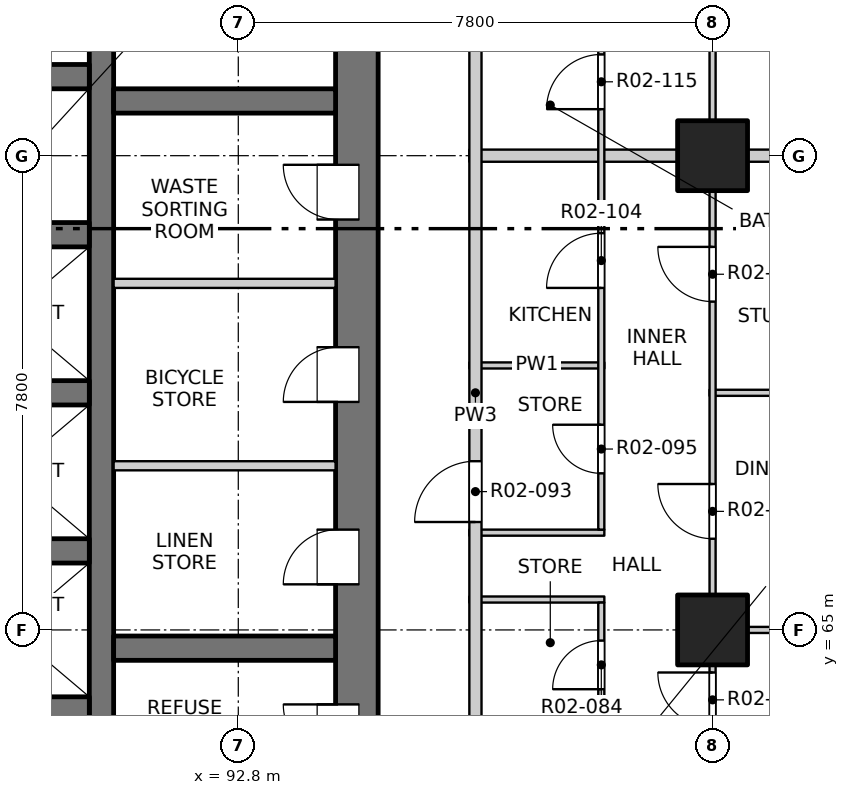
"""IFC4 building model, lengths in metres.
Left out: names, types, materials, properties, quantities, classifications, styles, units other than length and angle.
Written with IfcOpenShell. Run it as: python <this file> out.ifc"""

import sys

from ifc_helpers import new_model, si_unit, direction, frame, frame_2d, origin, origin_2d, place, context, subcontext, project, spatial, rectangle, extrude, element, fill, save


model = new_model("IFC4")
c1 = context("Model", 3, precision=1e-05, world=origin(), true_north=direction((0.0, 1.0)))
c2 = subcontext(c1, "Body", "Model", "MODEL_VIEW")
j1 = project(units=[si_unit("LENGTHUNIT", "METRE"), si_unit("PLANEANGLEUNIT", "RADIAN")], contexts=[c1])
p1 = place(None, origin())
s1 = spatial("IfcSite", under=j1, at=p1, CompositionType="ELEMENT")
p2 = place(p1, origin())
s2 = spatial("IfcBuilding", under=s1, at=p2, CompositionType="ELEMENT")
p3 = place(p2, frame((0.0, 0.0, 36.5)))
s3 = spatial("IfcBuildingStorey", under=s2, at=p3, CompositionType="ELEMENT", Elevation=36.5)
for number, where, z_axis, x_axis in (
    (1, (100.6, 65.0, -0.25), (0.0, 0.0, 1.0), (1.0, 0.0, 0.0)),
    (2, (100.6, 72.8, -0.25), (0.0, 0.0, 1.0), (1.0, 0.0, 0.0)),
):
    element("IfcColumn", number, at=place(p3, frame(where, z_axis=z_axis, x_axis=x_axis)), inside=s3, PredefinedType="COLUMN", context=c2, shape_type="SweptSolid", body=[
        extrude(rectangle(XDim=1.15, YDim=1.15, at=origin_2d()), origin(), (0.0, 0.0, 1.0), 3.4),
    ])
p4 = place(p3, frame((94.75, 61.95, -0.25), z_axis=(0.0, 0.0, 1.0), x_axis=(0.0, 1.0, 0.0)))
e3 = element("IfcWall", 3, at=p4, inside=s3, PredefinedType="SOLIDWALL", context=c2, shape_type="SweptSolid", body=[
    extrude(rectangle(XDim=15.35, YDim=0.7, at=frame_2d((7.675, 0.0))), origin(), (0.0, 0.0, 1.0), 3.4),
])
p5 = place(p4, frame((0.925, 0.0, 0.25)))
e4 = element("IfcOpeningElement", 4, at=p5, cuts=e3, PredefinedType="OPENING", context=c2, shape_type="SweptSolid", body=[
    extrude(rectangle(XDim=0.9, YDim=2.1, at=frame_2d((0.45, 1.05))), frame((0.0, 0.36, 0.0), z_axis=(0.0, -1.0, 0.0), x_axis=(1.0, 0.0, 0.0)), (0.0, 0.0, 1.0), 0.72),
])
p6 = place(p4, frame((3.8, 0.0, 0.25)))
e5 = element("IfcOpeningElement", 5, at=p6, cuts=e3, PredefinedType="OPENING", context=c2, shape_type="SweptSolid", body=[
    extrude(rectangle(XDim=0.9, YDim=2.1, at=frame_2d((0.45, 1.05))), frame((0.0, 0.36, 0.0), z_axis=(0.0, -1.0, 0.0), x_axis=(1.0, 0.0, 0.0)), (0.0, 0.0, 1.0), 0.72),
])
p7 = place(p4, frame((6.8, 0.0, 0.25)))
e6 = element("IfcOpeningElement", 6, at=p7, cuts=e3, PredefinedType="OPENING", context=c2, shape_type="SweptSolid", body=[
    extrude(rectangle(XDim=0.9, YDim=2.1, at=frame_2d((0.45, 1.05))), frame((0.0, 0.36, 0.0), z_axis=(0.0, -1.0, 0.0), x_axis=(1.0, 0.0, 0.0)), (0.0, 0.0, 1.0), 0.72),
])
p8 = place(p4, frame((9.8, 0.0, 0.25)))
e7 = element("IfcOpeningElement", 7, at=p8, cuts=e3, PredefinedType="OPENING", context=c2, shape_type="SweptSolid", body=[
    extrude(rectangle(XDim=0.9, YDim=2.1, at=frame_2d((0.45, 1.05))), frame((0.0, 0.36, 0.0), z_axis=(0.0, -1.0, 0.0), x_axis=(1.0, 0.0, 0.0)), (0.0, 0.0, 1.0), 0.72),
])
p9 = place(p4, frame((13.1, 0.0, 0.25)))
e8 = element("IfcOpeningElement", 8, at=p9, cuts=e3, PredefinedType="OPENING", context=c2, shape_type="SweptSolid", body=[
    extrude(rectangle(XDim=0.9, YDim=2.1, at=frame_2d((0.45, 1.05))), frame((0.0, 0.36, 0.0), z_axis=(0.0, -1.0, 0.0), x_axis=(1.0, 0.0, 0.0)), (0.0, 0.0, 1.0), 0.72),
])
p10 = place(p3, frame((90.55, 61.95, -0.25), z_axis=(0.0, 0.0, 1.0), x_axis=(0.0, 1.0, 0.0)))
e9 = element("IfcWall", 9, at=p10, inside=s3, PredefinedType="SOLIDWALL", context=c2, shape_type="SweptSolid", body=[
    extrude(rectangle(XDim=15.35, YDim=0.4, at=frame_2d((7.675, 0.0))), origin(), (0.0, 0.0, 1.0), 3.4),
])
for number, where, z_axis, x_axis in (
    (10, (87.35, 63.7, -0.25), (0.0, 0.0, 1.0), (1.0, 0.0, 0.0)),
    (11, (87.35, 66.3, -0.25), (0.0, 0.0, 1.0), (1.0, 0.0, 0.0)),
    (12, (87.35, 68.9, -0.25), (0.0, 0.0, 1.0), (1.0, 0.0, 0.0)),
    (13, (87.35, 71.5, -0.25), (0.0, 0.0, 1.0), (1.0, 0.0, 0.0)),
    (14, (87.35, 74.1, -0.25), (0.0, 0.0, 1.0), (1.0, 0.0, 0.0)),
):
    element("IfcWall", number, at=place(p3, frame(where, z_axis=z_axis, x_axis=x_axis)), inside=s3, PredefinedType="SOLIDWALL", context=c2, shape_type="SweptSolid", body=[
        extrude(rectangle(XDim=3.0, YDim=0.4, at=frame_2d((1.5, 0.0))), origin(), (0.0, 0.0, 1.0), 3.4),
    ])
for number, where, z_axis, x_axis in (
    (15, (90.75, 64.7, -0.25), (0.0, 0.0, 1.0), (1.0, 0.0, 0.0)),
    (16, (90.75, 73.7, -0.25), (0.0, 0.0, 1.0), (1.0, 0.0, 0.0)),
):
    element("IfcWall", number, at=place(p3, frame(where, z_axis=z_axis, x_axis=x_axis)), inside=s3, PredefinedType="SOLIDWALL", context=c2, shape_type="SweptSolid", body=[
        extrude(rectangle(XDim=3.65, YDim=0.4, at=frame_2d((1.825, 0.0))), origin(), (0.0, 0.0, 1.0), 3.4),
    ])
p11 = place(p3, frame((100.55, 65.0, 0.0), z_axis=(0.0, 0.0, 1.0), x_axis=(1.0, 0.0, 0.0)))
e17 = element("IfcWall", 17, at=p11, inside=s3, PredefinedType="PARTITIONING", context=c2, shape_type="SweptSolid", body=[
    extrude(rectangle(XDim=7.55, YDim=0.1, at=frame_2d((3.775, 0.0))), origin(), (0.0, 0.0, 1.0), 2.55),
])
for number, where, z_axis, x_axis in (
    (18, (96.6, 65.5, 0.0), (0.0, 0.0, 1.0), (1.0, 0.0, 0.0)),
    (19, (96.6, 66.6, 0.0), (0.0, 0.0, 1.0), (1.0, 0.0, 0.0)),
):
    element("IfcWall", number, at=place(p3, frame(where, z_axis=z_axis, x_axis=x_axis)), inside=s3, PredefinedType="PARTITIONING", context=c2, shape_type="SweptSolid", body=[
        extrude(rectangle(XDim=2.22, YDim=0.1, at=frame_2d((1.11, 0.0))), origin(), (0.0, 0.0, 1.0), 3.15),
    ])
p12 = place(p3, frame((90.75, 67.7, 0.0), z_axis=(0.0, 0.0, 1.0), x_axis=(1.0, 0.0, 0.0)))
e20 = element("IfcWall", 20, at=p12, inside=s3, PredefinedType="PARTITIONING", context=c2, shape_type="SweptSolid", body=[
    extrude(rectangle(XDim=3.65, YDim=0.15, at=frame_2d((1.825, 0.0))), origin(), (0.0, 0.0, 1.0), 3.15),
])
p13 = place(p3, frame((100.55, 68.9, 0.0), z_axis=(0.0, 0.0, 1.0), x_axis=(1.0, 0.0, 0.0)))
e21 = element("IfcWall", 21, at=p13, inside=s3, PredefinedType="PARTITIONING", context=c2, shape_type="SweptSolid", body=[
    extrude(rectangle(XDim=7.55, YDim=0.1, at=frame_2d((3.775, 0.0))), origin(), (0.0, 0.0, 1.0), 3.15),
])
p14 = place(p3, frame((96.6, 69.35, 0.0), z_axis=(0.0, 0.0, 1.0), x_axis=(1.0, 0.0, 0.0)))
e22 = element("IfcWall", 22, at=p14, inside=s3, PredefinedType="PARTITIONING", context=c2, shape_type="SweptSolid", body=[
    extrude(rectangle(XDim=2.22, YDim=0.1, at=frame_2d((1.11, 0.0))), origin(), (0.0, 0.0, 1.0), 3.15),
])
p15 = place(p3, frame((90.75, 70.7, 0.0), z_axis=(0.0, 0.0, 1.0), x_axis=(1.0, 0.0, 0.0)))
e23 = element("IfcWall", 23, at=p15, inside=s3, PredefinedType="PARTITIONING", context=c2, shape_type="SweptSolid", body=[
    extrude(rectangle(XDim=3.65, YDim=0.15, at=frame_2d((1.825, 0.0))), origin(), (0.0, 0.0, 1.0), 3.15),
])
p16 = place(p3, frame((96.6, 72.8, 0.0), z_axis=(0.0, 0.0, 1.0), x_axis=(1.0, 0.0, 0.0)))
e24 = element("IfcWall", 24, at=p16, inside=s3, PredefinedType="PARTITIONING", context=c2, shape_type="SweptSolid", body=[
    extrude(rectangle(XDim=4.0, YDim=0.2, at=frame_2d((2.0, 0.0))), origin(), (0.0, 0.0, 1.0), 3.15),
])
p17 = place(p3, frame((100.6, 72.8, 0.0), z_axis=(0.0, 0.0, 1.0), x_axis=(1.0, 0.0, 0.0)))
e25 = element("IfcWall", 25, at=p17, inside=s3, PredefinedType="PARTITIONING", context=c2, shape_type="SweptSolid", body=[
    extrude(rectangle(XDim=7.5, YDim=0.2, at=frame_2d((3.75, 0.0))), origin(), (0.0, 0.0, 1.0), 2.55),
])
p18 = place(p3, frame((96.7, 53.4, 0.0), z_axis=(0.0, 0.0, 1.0), x_axis=(0.0, 1.0, 0.0)))
e26 = element("IfcWall", 26, at=p18, inside=s3, PredefinedType="PARTITIONING", context=c2, shape_type="SweptSolid", body=[
    extrude(rectangle(XDim=31.0, YDim=0.2, at=frame_2d((15.5, 0.0))), origin(), (0.0, 0.0, 1.0), 3.15),
])
p19 = place(p18, frame((2.425, 0.0, 0.0)))
e27 = element("IfcOpeningElement", 27, at=p19, cuts=e26, PredefinedType="OPENING", context=c2, shape_type="SweptSolid", body=[
    extrude(rectangle(XDim=1.0, YDim=2.1, at=frame_2d((0.5, 1.05))), frame((0.0, 0.11, 0.0), z_axis=(0.0, -1.0, 0.0), x_axis=(1.0, 0.0, 0.0)), (0.0, 0.0, 1.0), 0.22),
])
p20 = place(p18, frame((13.375, 0.0, 0.0)))
e28 = element("IfcOpeningElement", 28, at=p20, cuts=e26, PredefinedType="OPENING", context=c2, shape_type="SweptSolid", body=[
    extrude(rectangle(XDim=1.0, YDim=2.1, at=frame_2d((0.5, 1.05))), frame((0.0, 0.11, 0.0), z_axis=(0.0, -1.0, 0.0), x_axis=(1.0, 0.0, 0.0)), (0.0, 0.0, 1.0), 0.22),
])
p21 = place(p18, frame((29.525, 0.0, 0.0)))
e29 = element("IfcOpeningElement", 29, at=p21, cuts=e26, PredefinedType="OPENING", context=c2, shape_type="SweptSolid", body=[
    extrude(rectangle(XDim=1.0, YDim=2.1, at=frame_2d((0.5, 1.05))), frame((0.0, 0.11, 0.0), z_axis=(0.0, -1.0, 0.0), x_axis=(1.0, 0.0, 0.0)), (0.0, 0.0, 1.0), 0.22),
])
p22 = place(p3, frame((98.77, 55.7, 0.0), z_axis=(0.0, 0.0, 1.0), x_axis=(0.0, 1.0, 0.0)))
e30 = element("IfcWall", 30, at=p22, inside=s3, PredefinedType="PARTITIONING", context=c2, shape_type="SweptSolid", body=[
    extrude(rectangle(XDim=9.75, YDim=0.1, at=frame_2d((4.875, 0.0))), origin(), (0.0, 0.0, 1.0), 3.15),
])
p23 = place(p22, frame((0.7, 0.0, 0.0)))
e31 = element("IfcOpeningElement", 31, at=p23, cuts=e30, PredefinedType="OPENING", context=c2, shape_type="SweptSolid", body=[
    extrude(rectangle(XDim=0.8, YDim=2.1, at=frame_2d((0.4, 1.05))), frame((0.0, 0.06, 0.0), z_axis=(0.0, -1.0, 0.0), x_axis=(1.0, 0.0, 0.0)), (0.0, 0.0, 1.0), 0.12),
])
p24 = place(p22, frame((3.375, 0.0, 0.0)))
e32 = element("IfcOpeningElement", 32, at=p24, cuts=e30, PredefinedType="OPENING", context=c2, shape_type="SweptSolid", body=[
    extrude(rectangle(XDim=0.9, YDim=2.1, at=frame_2d((0.45, 1.05))), frame((0.0, 0.06, 0.0), z_axis=(0.0, -1.0, 0.0), x_axis=(1.0, 0.0, 0.0)), (0.0, 0.0, 1.0), 0.12),
])
p25 = place(p22, frame((6.075, 0.0, 0.0)))
e33 = element("IfcOpeningElement", 33, at=p25, cuts=e30, PredefinedType="OPENING", context=c2, shape_type="SweptSolid", body=[
    extrude(rectangle(XDim=0.9, YDim=2.1, at=frame_2d((0.45, 1.05))), frame((0.0, 0.06, 0.0), z_axis=(0.0, -1.0, 0.0), x_axis=(1.0, 0.0, 0.0)), (0.0, 0.0, 1.0), 0.12),
])
p26 = place(p22, frame((8.325, 0.0, 0.0)))
e34 = element("IfcOpeningElement", 34, at=p26, cuts=e30, PredefinedType="OPENING", context=c2, shape_type="SweptSolid", body=[
    extrude(rectangle(XDim=0.8, YDim=2.1, at=frame_2d((0.4, 1.05))), frame((0.0, 0.06, 0.0), z_axis=(0.0, -1.0, 0.0), x_axis=(1.0, 0.0, 0.0)), (0.0, 0.0, 1.0), 0.12),
])
p27 = place(p3, frame((98.77, 66.65, 0.0), z_axis=(0.0, 0.0, 1.0), x_axis=(0.0, 1.0, 0.0)))
e35 = element("IfcWall", 35, at=p27, inside=s3, PredefinedType="PARTITIONING", context=c2, shape_type="SweptSolid", body=[
    extrude(rectangle(XDim=14.95, YDim=0.1, at=frame_2d((7.475, 0.0))), origin(), (0.0, 0.0, 1.0), 3.15),
])
p28 = place(p27, frame((0.925, 0.0, 0.0)))
e36 = element("IfcOpeningElement", 36, at=p28, cuts=e35, PredefinedType="OPENING", context=c2, shape_type="SweptSolid", body=[
    extrude(rectangle(XDim=0.8, YDim=2.1, at=frame_2d((0.4, 1.05))), frame((0.0, 0.06, 0.0), z_axis=(0.0, -1.0, 0.0), x_axis=(1.0, 0.0, 0.0)), (0.0, 0.0, 1.0), 0.12),
])
p29 = place(p27, frame((3.975, 0.0, 0.0)))
e37 = element("IfcOpeningElement", 37, at=p29, cuts=e35, PredefinedType="OPENING", context=c2, shape_type="SweptSolid", body=[
    extrude(rectangle(XDim=0.9, YDim=2.1, at=frame_2d((0.45, 1.05))), frame((0.0, 0.06, 0.0), z_axis=(0.0, -1.0, 0.0), x_axis=(1.0, 0.0, 0.0)), (0.0, 0.0, 1.0), 0.12),
])
p30 = place(p27, frame((6.915, 0.0, 0.0)))
e38 = element("IfcOpeningElement", 38, at=p30, cuts=e35, PredefinedType="OPENING", context=c2, shape_type="SweptSolid", body=[
    extrude(rectangle(XDim=0.9, YDim=2.1, at=frame_2d((0.45, 1.05))), frame((0.0, 0.06, 0.0), z_axis=(0.0, -1.0, 0.0), x_axis=(1.0, 0.0, 0.0)), (0.0, 0.0, 1.0), 0.12),
])
p31 = place(p27, frame((9.63, 0.0, 0.0)))
e39 = element("IfcOpeningElement", 39, at=p31, cuts=e35, PredefinedType="OPENING", context=c2, shape_type="SweptSolid", body=[
    extrude(rectangle(XDim=0.8, YDim=2.1, at=frame_2d((0.4, 1.05))), frame((0.0, 0.06, 0.0), z_axis=(0.0, -1.0, 0.0), x_axis=(1.0, 0.0, 0.0)), (0.0, 0.0, 1.0), 0.12),
])
p32 = place(p27, frame((12.79, 0.0, 0.0)))
e40 = element("IfcOpeningElement", 40, at=p32, cuts=e35, PredefinedType="OPENING", context=c2, shape_type="SweptSolid", body=[
    extrude(rectangle(XDim=0.9, YDim=2.1, at=frame_2d((0.45, 1.05))), frame((0.0, 0.06, 0.0), z_axis=(0.0, -1.0, 0.0), x_axis=(1.0, 0.0, 0.0)), (0.0, 0.0, 1.0), 0.12),
])
p33 = place(p3, frame((100.6, 49.4, 0.0), z_axis=(0.0, 0.0, 1.0), x_axis=(0.0, 1.0, 0.0)))
e41 = element("IfcWall", 41, at=p33, inside=s3, PredefinedType="PARTITIONING", context=c2, shape_type="SweptSolid", body=[
    extrude(rectangle(XDim=31.2, YDim=0.1, at=frame_2d((15.6, 0.0))), origin(), (0.0, 0.0, 1.0), 3.15),
])
p34 = place(p33, frame((2.475, 0.0, 0.0)))
e42 = element("IfcOpeningElement", 42, at=p34, cuts=e41, PredefinedType="OPENING", context=c2, shape_type="SweptSolid", body=[
    extrude(rectangle(XDim=0.9, YDim=2.1, at=frame_2d((0.45, 1.05))), frame((0.0, 0.06, 0.0), z_axis=(0.0, -1.0, 0.0), x_axis=(1.0, 0.0, 0.0)), (0.0, 0.0, 1.0), 0.12),
])
p35 = place(p33, frame((5.4, 0.0, 0.0)))
e43 = element("IfcOpeningElement", 43, at=p35, cuts=e41, PredefinedType="OPENING", context=c2, shape_type="SweptSolid", body=[
    extrude(rectangle(XDim=0.9, YDim=2.1, at=frame_2d((0.45, 1.05))), frame((0.0, 0.06, 0.0), z_axis=(0.0, -1.0, 0.0), x_axis=(1.0, 0.0, 0.0)), (0.0, 0.0, 1.0), 0.12),
])
p36 = place(p33, frame((10.275, 0.0, 0.0)))
e44 = element("IfcOpeningElement", 44, at=p36, cuts=e41, PredefinedType="OPENING", context=c2, shape_type="SweptSolid", body=[
    extrude(rectangle(XDim=0.9, YDim=2.1, at=frame_2d((0.45, 1.05))), frame((0.0, 0.06, 0.0), z_axis=(0.0, -1.0, 0.0), x_axis=(1.0, 0.0, 0.0)), (0.0, 0.0, 1.0), 0.12),
])
p37 = place(p33, frame((14.0, 0.0, 0.0)))
e45 = element("IfcOpeningElement", 45, at=p37, cuts=e41, PredefinedType="OPENING", context=c2, shape_type="SweptSolid", body=[
    extrude(rectangle(XDim=0.9, YDim=2.1, at=frame_2d((0.45, 1.05))), frame((0.0, 0.06, 0.0), z_axis=(0.0, -1.0, 0.0), x_axis=(1.0, 0.0, 0.0)), (0.0, 0.0, 1.0), 0.12),
])
p38 = place(p33, frame((17.1, 0.0, 0.0)))
e46 = element("IfcOpeningElement", 46, at=p38, cuts=e41, PredefinedType="OPENING", context=c2, shape_type="SweptSolid", body=[
    extrude(rectangle(XDim=0.9, YDim=2.1, at=frame_2d((0.45, 1.05))), frame((0.0, 0.06, 0.0), z_axis=(0.0, -1.0, 0.0), x_axis=(1.0, 0.0, 0.0)), (0.0, 0.0, 1.0), 0.12),
])
p39 = place(p33, frame((21.0, 0.0, 0.0)))
e47 = element("IfcOpeningElement", 47, at=p39, cuts=e41, PredefinedType="OPENING", context=c2, shape_type="SweptSolid", body=[
    extrude(rectangle(XDim=0.9, YDim=2.1, at=frame_2d((0.45, 1.05))), frame((0.0, 0.06, 0.0), z_axis=(0.0, -1.0, 0.0), x_axis=(1.0, 0.0, 0.0)), (0.0, 0.0, 1.0), 0.12),
])
p40 = place(p33, frame((25.875, 0.0, 0.0)))
e48 = element("IfcOpeningElement", 48, at=p40, cuts=e41, PredefinedType="OPENING", context=c2, shape_type="SweptSolid", body=[
    extrude(rectangle(XDim=0.9, YDim=2.1, at=frame_2d((0.45, 1.05))), frame((0.0, 0.06, 0.0), z_axis=(0.0, -1.0, 0.0), x_axis=(1.0, 0.0, 0.0)), (0.0, 0.0, 1.0), 0.12),
])
p41 = place(p33, frame((29.6, 0.0, 0.0)))
e49 = element("IfcOpeningElement", 49, at=p41, cuts=e41, PredefinedType="OPENING", context=c2, shape_type="SweptSolid", body=[
    extrude(rectangle(XDim=0.9, YDim=2.1, at=frame_2d((0.45, 1.05))), frame((0.0, 0.06, 0.0), z_axis=(0.0, -1.0, 0.0), x_axis=(1.0, 0.0, 0.0)), (0.0, 0.0, 1.0), 0.12),
])
p42 = place(p5, origin())
e50 = element("IfcDoor", 50, at=p42, inside=s3, OperationType="SINGLE_SWING_RIGHT", PredefinedType="DOOR", context=c2, shape_type="SweptSolid", body=[
    extrude(rectangle(XDim=0.9, YDim=2.1, at=frame_2d((0.45, 1.05))), frame((0.0, 0.335, 0.0), z_axis=(0.0, -1.0, 0.0), x_axis=(1.0, 0.0, 0.0)), (0.0, 0.0, 1.0), 0.05),
])
fill(e4, e50)
p43 = place(p37, origin())
e51 = element("IfcDoor", 51, at=p43, inside=s3, OperationType="SINGLE_SWING_RIGHT", PredefinedType="DOOR", context=c2, shape_type="SweptSolid", body=[
    extrude(rectangle(XDim=0.9, YDim=2.1, at=frame_2d((0.45, 1.05))), frame((0.0, 0.025, 0.0), z_axis=(0.0, -1.0, 0.0), x_axis=(1.0, 0.0, 0.0)), (0.0, 0.0, 1.0), 0.05),
])
fill(e45, e51)
p44 = place(p26, origin())
e52 = element("IfcDoor", 52, at=p44, inside=s3, OperationType="SINGLE_SWING_LEFT", PredefinedType="DOOR", context=c2, shape_type="SweptSolid", body=[
    extrude(rectangle(XDim=0.8, YDim=2.1, at=frame_2d((0.4, 1.05))), frame((0.0, 0.025, 0.0), z_axis=(0.0, -1.0, 0.0), x_axis=(1.0, 0.0, 0.0)), (0.0, 0.0, 1.0), 0.05),
])
fill(e34, e52)
p45 = place(p6, origin())
e53 = element("IfcDoor", 53, at=p45, inside=s3, OperationType="SINGLE_SWING_LEFT", PredefinedType="DOOR", context=c2, shape_type="SweptSolid", body=[
    extrude(rectangle(XDim=0.9, YDim=2.1, at=frame_2d((0.45, 1.05))), frame((0.0, 0.335, 0.0), z_axis=(0.0, -1.0, 0.0), x_axis=(1.0, 0.0, 0.0)), (0.0, 0.0, 1.0), 0.05),
])
fill(e5, e53)
p46 = place(p38, origin())
e54 = element("IfcDoor", 54, at=p46, inside=s3, OperationType="SINGLE_SWING_RIGHT", PredefinedType="DOOR", context=c2, shape_type="SweptSolid", body=[
    extrude(rectangle(XDim=0.9, YDim=2.1, at=frame_2d((0.45, 1.05))), frame((0.0, 0.025, 0.0), z_axis=(0.0, -1.0, 0.0), x_axis=(1.0, 0.0, 0.0)), (0.0, 0.0, 1.0), 0.05),
])
fill(e46, e54)
p47 = place(p20, origin())
e55 = element("IfcDoor", 55, at=p47, inside=s3, OperationType="SINGLE_SWING_LEFT", PredefinedType="DOOR", context=c2, shape_type="SweptSolid", body=[
    extrude(rectangle(XDim=1.0, YDim=2.1, at=frame_2d((0.5, 1.05))), frame((0.0, 0.025, 0.0), z_axis=(0.0, -1.0, 0.0), x_axis=(1.0, 0.0, 0.0)), (0.0, 0.0, 1.0), 0.05),
])
fill(e28, e55)
p48 = place(p28, origin())
e56 = element("IfcDoor", 56, at=p48, inside=s3, OperationType="SINGLE_SWING_RIGHT", PredefinedType="DOOR", context=c2, shape_type="SweptSolid", body=[
    extrude(rectangle(XDim=0.8, YDim=2.1, at=frame_2d((0.4, 1.05))), frame((0.0, 0.025, 0.0), z_axis=(0.0, -1.0, 0.0), x_axis=(1.0, 0.0, 0.0)), (0.0, 0.0, 1.0), 0.05),
])
fill(e36, e56)
p49 = place(p7, origin())
e57 = element("IfcDoor", 57, at=p49, inside=s3, OperationType="SINGLE_SWING_LEFT", PredefinedType="DOOR", context=c2, shape_type="SweptSolid", body=[
    extrude(rectangle(XDim=0.9, YDim=2.1, at=frame_2d((0.45, 1.05))), frame((0.0, 0.335, 0.0), z_axis=(0.0, -1.0, 0.0), x_axis=(1.0, 0.0, 0.0)), (0.0, 0.0, 1.0), 0.05),
])
fill(e6, e57)
p50 = place(p39, origin())
e58 = element("IfcDoor", 58, at=p50, inside=s3, OperationType="SINGLE_SWING_RIGHT", PredefinedType="DOOR", context=c2, shape_type="SweptSolid", body=[
    extrude(rectangle(XDim=0.9, YDim=2.1, at=frame_2d((0.45, 1.05))), frame((0.0, 0.025, 0.0), z_axis=(0.0, -1.0, 0.0), x_axis=(1.0, 0.0, 0.0)), (0.0, 0.0, 1.0), 0.05),
])
fill(e47, e58)
p51 = place(p29, origin())
e59 = element("IfcDoor", 59, at=p51, inside=s3, OperationType="SINGLE_SWING_LEFT", PredefinedType="DOOR", context=c2, shape_type="SweptSolid", body=[
    extrude(rectangle(XDim=0.9, YDim=2.1, at=frame_2d((0.45, 1.05))), frame((0.0, 0.025, 0.0), z_axis=(0.0, -1.0, 0.0), x_axis=(1.0, 0.0, 0.0)), (0.0, 0.0, 1.0), 0.05),
])
fill(e37, e59)
p52 = place(p8, origin())
e60 = element("IfcDoor", 60, at=p52, inside=s3, OperationType="SINGLE_SWING_RIGHT", PredefinedType="DOOR", context=c2, shape_type="SweptSolid", body=[
    extrude(rectangle(XDim=0.9, YDim=2.1, at=frame_2d((0.45, 1.05))), frame((0.0, 0.335, 0.0), z_axis=(0.0, -1.0, 0.0), x_axis=(1.0, 0.0, 0.0)), (0.0, 0.0, 1.0), 0.05),
])
fill(e7, e60)
p53 = place(p30, origin())
e61 = element("IfcDoor", 61, at=p53, inside=s3, OperationType="SINGLE_SWING_LEFT", PredefinedType="DOOR", context=c2, shape_type="SweptSolid", body=[
    extrude(rectangle(XDim=0.9, YDim=2.1, at=frame_2d((0.45, 1.05))), frame((0.0, 0.025, 0.0), z_axis=(0.0, -1.0, 0.0), x_axis=(1.0, 0.0, 0.0)), (0.0, 0.0, 1.0), 0.05),
])
fill(e38, e61)
save(model, sys.argv[1])
